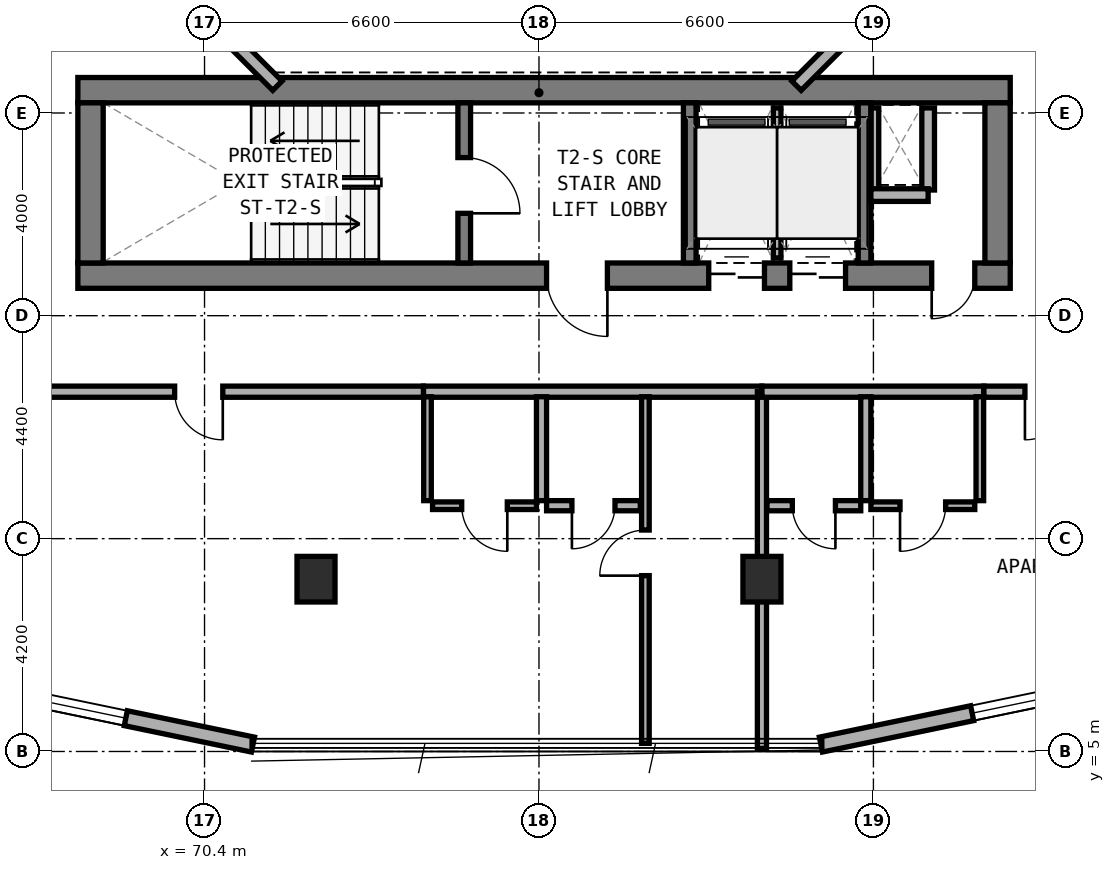
"""IFC4 building model, lengths in metres.
Left out: names, types, materials, properties, quantities, classifications, styles, units other than length and angle.
Written with IfcOpenShell. Run it as: python <this file> out.ifc"""

import sys

from ifc_helpers import new_model, si_unit, direction, frame, frame_2d, origin, origin_2d, place, context, subcontext, project, spatial, rectangle, extrude, element, fill, save


model = new_model("IFC4")
c1 = context("Model", 3, precision=1e-05, world=origin(), true_north=direction((0.0, 1.0)))
c2 = subcontext(c1, "Body", "Model", "MODEL_VIEW")
j1 = project(units=[si_unit("LENGTHUNIT", "METRE"), si_unit("PLANEANGLEUNIT", "RADIAN")], contexts=[c1])
p1 = place(None, origin())
s1 = spatial("IfcSite", under=j1, at=p1, CompositionType="ELEMENT")
p2 = place(p1, origin())
s2 = spatial("IfcBuilding", under=s1, at=p2, CompositionType="ELEMENT")
p3 = place(p2, frame((0.0, 0.0, 62.5)))
s3 = spatial("IfcBuildingStorey", under=s2, at=p3, CompositionType="ELEMENT", Elevation=62.5)
p4 = place(p3, frame((67.9, 14.39, 0.0), z_axis=(0.0, 0.0, 1.0), x_axis=(1.0, 0.0, 0.0)))
e1 = element("IfcWall", 1, at=p4, inside=s3, PredefinedType="SHEAR", context=c2, shape_type="SweptSolid", body=[
    extrude(rectangle(XDim=18.4, YDim=0.5, at=frame_2d((9.2, 0.0))), origin(), (0.0, 0.0, 1.0), 3.5),
])
p5 = place(p4, frame((9.25, 0.0, 0.0)))
e2 = element("IfcOpeningElement", 2, at=p5, cuts=e1, PredefinedType="OPENING", context=c2, shape_type="SweptSolid", body=[
    extrude(rectangle(XDim=1.2, YDim=2.15, at=frame_2d((0.6, 1.075))), frame((0.0, 0.26, 0.0), z_axis=(0.0, -1.0, 0.0), x_axis=(1.0, 0.0, 0.0)), (0.0, 0.0, 1.0), 0.52),
])
p6 = place(p4, frame((16.85, 0.0, 0.0)))
e3 = element("IfcOpeningElement", 3, at=p6, cuts=e1, PredefinedType="OPENING", context=c2, shape_type="SweptSolid", body=[
    extrude(rectangle(XDim=0.85, YDim=2.1, at=frame_2d((0.425, 1.05))), frame((0.0, 0.26, 0.0), z_axis=(0.0, -1.0, 0.0), x_axis=(1.0, 0.0, 0.0)), (0.0, 0.0, 1.0), 0.52),
])
p7 = place(p4, frame((12.45, 0.0, 0.0)))
e4 = element("IfcOpeningElement", 4, at=p7, cuts=e1, PredefinedType="OPENING", context=c2, shape_type="SweptSolid", body=[
    extrude(rectangle(XDim=1.1, YDim=2.15, at=frame_2d((0.55, 1.075))), frame((0.0, 0.26, 0.0), z_axis=(0.0, -1.0, 0.0), x_axis=(1.0, 0.0, 0.0)), (0.0, 0.0, 1.0), 0.52),
])
p8 = place(p4, frame((14.05, 0.0, 0.0)))
e5 = element("IfcOpeningElement", 5, at=p8, cuts=e1, PredefinedType="OPENING", context=c2, shape_type="SweptSolid", body=[
    extrude(rectangle(XDim=1.1, YDim=2.15, at=frame_2d((0.55, 1.075))), frame((0.0, 0.26, 0.0), z_axis=(0.0, -1.0, 0.0), x_axis=(1.0, 0.0, 0.0)), (0.0, 0.0, 1.0), 0.52),
])
p9 = place(p3, frame((67.9, 18.05, 0.0), z_axis=(0.0, 0.0, 1.0), x_axis=(1.0, 0.0, 0.0)))
e6 = element("IfcWall", 6, at=p9, inside=s3, PredefinedType="SHEAR", context=c2, shape_type="SweptSolid", body=[
    extrude(rectangle(XDim=18.4, YDim=0.5, at=frame_2d((9.2, 0.0))), origin(), (0.0, 0.0, 1.0), 3.5),
])
for number, where, z_axis, x_axis in (
    (7, (68.15, 14.64, 0.0), (0.0, 0.0, 1.0), (0.0, 1.0, 0.0)),
    (8, (86.05, 14.64, 0.0), (0.0, 0.0, 1.0), (0.0, 1.0, 0.0)),
):
    element("IfcWall", number, at=place(p3, frame(where, z_axis=z_axis, x_axis=x_axis)), inside=s3, PredefinedType="SHEAR", context=c2, shape_type="SweptSolid", body=[
        extrude(rectangle(XDim=3.16, YDim=0.5, at=frame_2d((1.58, 0.0))), origin(), (0.0, 0.0, 1.0), 3.5),
    ])
p10 = place(p3, frame((75.525, 14.64, 0.0), z_axis=(0.0, 0.0, 1.0), x_axis=(0.0, 1.0, 0.0)))
e9 = element("IfcWall", 9, at=p10, inside=s3, PredefinedType="STANDARD", context=c2, shape_type="SweptSolid", body=[
    extrude(rectangle(XDim=3.16, YDim=0.25, at=frame_2d((1.58, 0.0))), origin(), (0.0, 0.0, 1.0), 3.25),
])
p11 = place(p10, frame((0.98, 0.0, 0.0)))
e10 = element("IfcOpeningElement", 10, at=p11, cuts=e9, PredefinedType="OPENING", context=c2, shape_type="SweptSolid", body=[
    extrude(rectangle(XDim=1.1, YDim=2.15, at=frame_2d((0.55, 1.075))), frame((0.0, 0.135, 0.0), z_axis=(0.0, -1.0, 0.0), x_axis=(1.0, 0.0, 0.0)), (0.0, 0.0, 1.0), 0.27),
])
for number, where, z_axis, x_axis in (
    (11, (79.975, 14.64, 0.0), (0.0, 0.0, 1.0), (0.0, 1.0, 0.0)),
    (12, (83.425, 14.64, 0.0), (0.0, 0.0, 1.0), (0.0, 1.0, 0.0)),
):
    element("IfcWall", number, at=place(p3, frame(where, z_axis=z_axis, x_axis=x_axis)), inside=s3, PredefinedType="STANDARD", context=c2, shape_type="SweptSolid", body=[
        extrude(rectangle(XDim=3.16, YDim=0.25, at=frame_2d((1.58, 0.0))), origin(), (0.0, 0.0, 1.0), 3.25),
    ])
for number, where, z_axis, x_axis in (
    (13, (72.6, 8.4, 0.0), (0.0, 0.0, 1.0), (1.0, 0.0, 0.0)),
    (14, (81.4, 8.4, 0.0), (0.0, 0.0, 1.0), (1.0, 0.0, 0.0)),
):
    element("IfcColumn", number, at=place(p3, frame(where, z_axis=z_axis, x_axis=x_axis)), inside=s3, PredefinedType="COLUMN", context=c2, shape_type="SweptSolid", body=[
        extrude(rectangle(XDim=0.75, YDim=0.9, at=origin_2d()), origin(), (0.0, 0.0, 1.0), 3.5),
    ])
p12 = place(p3, frame((62.622, 6.949, 0.0), z_axis=(0.0, 0.0, 1.0), x_axis=(0.979127260729, -0.203248142175, 0.0)))
e15 = element("IfcWall", 15, at=p12, inside=s3, PredefinedType="STANDARD", context=c2, shape_type="SweptSolid", body=[
    extrude(rectangle(XDim=8.92, YDim=0.3, at=frame_2d((4.46, 0.0))), origin(), (0.0, 0.0, 1.0), 3.25),
])
p13 = place(p12, frame((3.957, 0.0, 0.8)))
e16 = element("IfcOpeningElement", 16, at=p13, cuts=e15, PredefinedType="OPENING", context=c2, shape_type="SweptSolid", body=[
    extrude(rectangle(XDim=2.4, YDim=1.6, at=frame_2d((1.2, 0.8))), frame((0.0, 0.16, 0.0), z_axis=(0.0, -1.0, 0.0), x_axis=(1.0, 0.0, 0.0)), (0.0, 0.0, 1.0), 0.32),
])
p14 = place(p3, frame((82.564, 5.136, 0.0), z_axis=(0.0, 0.0, 1.0), x_axis=(0.979128391325, 0.203242695569, 0.0)))
e17 = element("IfcWall", 17, at=p14, inside=s3, PredefinedType="STANDARD", context=c2, shape_type="SweptSolid", body=[
    extrude(rectangle(XDim=8.92, YDim=0.3, at=frame_2d((4.46, 0.0))), origin(), (0.0, 0.0, 1.0), 3.25),
])
p15 = place(p14, frame((3.048, 0.0, 0.8)))
e18 = element("IfcOpeningElement", 18, at=p15, cuts=e17, PredefinedType="OPENING", context=c2, shape_type="SweptSolid", body=[
    extrude(rectangle(XDim=2.4, YDim=1.6, at=frame_2d((1.2, 0.8))), frame((0.0, 0.16, 0.0), z_axis=(0.0, -1.0, 0.0), x_axis=(1.0, 0.0, 0.0)), (0.0, 0.0, 1.0), 0.32),
])
for number, where, z_axis, x_axis in (
    (19, (82.082, 18.138, 0.0), (0.0, 0.0, 1.0), (0.707, 0.707, 0.0)),
    (20, (70.204, 19.772, 0.0), (0.0, 0.0, 1.0), (0.707, -0.707, 0.0)),
):
    element("IfcWall", number, at=place(p3, frame(where, z_axis=z_axis, x_axis=x_axis)), inside=s3, PredefinedType="STANDARD", context=c2, shape_type="SweptSolid", body=[
        extrude(rectangle(XDim=2.311, YDim=0.26, at=frame_2d((1.155, 0.0))), origin(), (0.0, 0.0, 1.0), 3.25),
    ])
p16 = place(p3, frame((83.63, 16.08, 0.0), z_axis=(0.0, 0.0, 1.0), x_axis=(0.0, 1.0, 0.0)))
e21 = element("IfcWall", 21, at=p16, inside=s3, PredefinedType="PARTITIONING", context=c2, shape_type="SweptSolid", body=[
    extrude(rectangle(XDim=1.62, YDim=0.15, at=frame_2d((0.81, 0.0))), origin(), (0.0, 0.0, 1.0), 2.725),
])
p17 = place(p3, frame((84.68, 16.08, 0.0), z_axis=(0.0, 0.0, 1.0), x_axis=(0.0, 1.0, 0.0)))
e22 = element("IfcWall", 22, at=p17, inside=s3, PredefinedType="SOLIDWALL", context=c2, shape_type="SweptSolid", body=[
    extrude(rectangle(XDim=1.62, YDim=0.25, at=frame_2d((0.81, 0.0))), origin(), (0.0, 0.0, 1.0), 3.22),
])
p18 = place(p3, frame((83.55, 15.98, 0.0), z_axis=(0.0, 0.0, 1.0), x_axis=(1.0, 0.0, 0.0)))
e23 = element("IfcWall", 23, at=p18, inside=s3, PredefinedType="SOLIDWALL", context=c2, shape_type="SweptSolid", body=[
    extrude(rectangle(XDim=1.13, YDim=0.25, at=frame_2d((0.565, 0.0))), origin(), (0.0, 0.0, 1.0), 3.22),
])
p19 = place(p3, frame((81.7, 14.74, 0.0), z_axis=(0.0, 0.0, 1.0), x_axis=(0.0, 1.0, 0.0)))
e24 = element("IfcWall", 24, at=p19, inside=s3, PredefinedType="PARTITIONING", context=c2, shape_type="SweptSolid", body=[
    extrude(rectangle(XDim=2.96, YDim=0.15, at=frame_2d((1.48, 0.0))), origin(), (0.0, 0.0, 1.0), 3.22),
])
p20 = place(p3, frame((74.72, 12.1, 0.0), z_axis=(0.0, 0.0, 1.0), x_axis=(1.0, 0.0, 0.0)))
e25 = element("IfcWall", 25, at=p20, inside=s3, PredefinedType="SOLIDWALL", context=c2, shape_type="SweptSolid", body=[
    extrude(rectangle(XDim=6.68, YDim=0.22, at=frame_2d((3.34, 0.0))), origin(), (0.0, 0.0, 1.0), 2.725),
])
p21 = place(p3, frame((65.85, 12.1, 0.0), z_axis=(0.0, 0.0, 1.0), x_axis=(1.0, 0.0, 0.0)))
e26 = element("IfcWall", 26, at=p21, inside=s3, PredefinedType="SOLIDWALL", context=c2, shape_type="SweptSolid", body=[
    extrude(rectangle(XDim=8.87, YDim=0.22, at=frame_2d((4.435, 0.0))), origin(), (0.0, 0.0, 1.0), 2.725),
])
p22 = place(p21, frame((3.96, 0.0, 0.0)))
e27 = element("IfcOpeningElement", 27, at=p22, cuts=e26, PredefinedType="OPENING", context=c2, shape_type="SweptSolid", body=[
    extrude(rectangle(XDim=0.95, YDim=2.1, at=frame_2d((0.475, 1.05))), frame((0.0, 0.12, 0.0), z_axis=(0.0, -1.0, 0.0), x_axis=(1.0, 0.0, 0.0)), (0.0, 0.0, 1.0), 0.24),
])
p23 = place(p3, frame((79.1, 5.16, 0.0), z_axis=(0.0, 0.0, 1.0), x_axis=(0.0, 1.0, 0.0)))
e28 = element("IfcWall", 28, at=p23, inside=s3, PredefinedType="PARTITIONING", context=c2, shape_type="SweptSolid", body=[
    extrude(rectangle(XDim=6.84, YDim=0.15, at=frame_2d((3.42, 0.0))), origin(), (0.0, 0.0, 1.0), 2.865),
])
p24 = place(p23, frame((3.31, 0.0, 0.0)))
e29 = element("IfcOpeningElement", 29, at=p24, cuts=e28, PredefinedType="OPENING", context=c2, shape_type="SweptSolid", body=[
    extrude(rectangle(XDim=0.9, YDim=2.1, at=frame_2d((0.45, 1.05))), frame((0.0, 0.085, 0.0), z_axis=(0.0, -1.0, 0.0), x_axis=(1.0, 0.0, 0.0)), (0.0, 0.0, 1.0), 0.17),
])
p25 = place(p3, frame((77.05, 9.95, 0.0), z_axis=(0.0, 0.0, 1.0), x_axis=(0.0, 1.0, 0.0)))
e30 = element("IfcWall", 30, at=p25, inside=s3, PredefinedType="PLUMBINGWALL", context=c2, shape_type="SweptSolid", body=[
    extrude(rectangle(XDim=2.05, YDim=0.2, at=frame_2d((1.025, 0.0))), origin(), (0.0, 0.0, 1.0), 2.895),
])
p26 = place(p3, frame((74.8, 9.95, 0.0), z_axis=(0.0, 0.0, 1.0), x_axis=(0.0, 1.0, 0.0)))
e31 = element("IfcWall", 31, at=p26, inside=s3, PredefinedType="PARTITIONING", context=c2, shape_type="SweptSolid", body=[
    extrude(rectangle(XDim=2.05, YDim=0.15, at=frame_2d((1.025, 0.0))), origin(), (0.0, 0.0, 1.0), 2.895),
])
p27 = place(p3, frame((77.15, 9.85, 0.0), z_axis=(0.0, 0.0, 1.0), x_axis=(1.0, 0.0, 0.0)))
e32 = element("IfcWall", 32, at=p27, inside=s3, PredefinedType="PLUMBINGWALL", context=c2, shape_type="SweptSolid", body=[
    extrude(rectangle(XDim=1.85, YDim=0.2, at=frame_2d((0.925, 0.0))), origin(), (0.0, 0.0, 1.0), 3.22),
])
p28 = place(p27, frame((0.5, 0.0, 0.0)))
e33 = element("IfcOpeningElement", 33, at=p28, cuts=e32, PredefinedType="OPENING", context=c2, shape_type="SweptSolid", body=[
    extrude(rectangle(XDim=0.85, YDim=2.1, at=frame_2d((0.425, 1.05))), frame((0.0, 0.11, 0.0), z_axis=(0.0, -1.0, 0.0), x_axis=(1.0, 0.0, 0.0)), (0.0, 0.0, 1.0), 0.22),
])
p29 = place(p3, frame((74.9, 9.85, 0.0), z_axis=(0.0, 0.0, 1.0), x_axis=(1.0, 0.0, 0.0)))
e34 = element("IfcWall", 34, at=p29, inside=s3, PredefinedType="PARTITIONING", context=c2, shape_type="SweptSolid", body=[
    extrude(rectangle(XDim=2.05, YDim=0.15, at=frame_2d((1.025, 0.0))), origin(), (0.0, 0.0, 1.0), 3.22),
])
p30 = place(p29, frame((0.575, 0.0, 0.0)))
e35 = element("IfcOpeningElement", 35, at=p30, cuts=e34, PredefinedType="OPENING", context=c2, shape_type="SweptSolid", body=[
    extrude(rectangle(XDim=0.9, YDim=2.1, at=frame_2d((0.45, 1.05))), frame((0.0, 0.085, 0.0), z_axis=(0.0, -1.0, 0.0), x_axis=(1.0, 0.0, 0.0)), (0.0, 0.0, 1.0), 0.17),
])
p31 = place(p3, frame((81.4, 5.06, 0.0), z_axis=(0.0, 0.0, 1.0), x_axis=(0.0, 1.0, 0.0)))
e36 = element("IfcWall", 36, at=p31, inside=s3, PredefinedType="SOLIDWALL", context=c2, shape_type="SweptSolid", body=[
    extrude(rectangle(XDim=7.04, YDim=0.18, at=frame_2d((3.52, 0.0))), origin(), (0.0, 0.0, 1.0), 2.725),
])
p32 = place(p3, frame((81.4, 12.1, 0.0), z_axis=(0.0, 0.0, 1.0), x_axis=(1.0, 0.0, 0.0)))
e37 = element("IfcWall", 37, at=p32, inside=s3, PredefinedType="SOLIDWALL", context=c2, shape_type="SweptSolid", body=[
    extrude(rectangle(XDim=4.38, YDim=0.22, at=frame_2d((2.19, 0.0))), origin(), (0.0, 0.0, 1.0), 2.725),
])
p33 = place(p3, frame((85.78, 12.1, 0.0), z_axis=(0.0, 0.0, 1.0), x_axis=(1.0, 0.0, 0.0)))
e38 = element("IfcWall", 38, at=p33, inside=s3, PredefinedType="SOLIDWALL", context=c2, shape_type="SweptSolid", body=[
    extrude(rectangle(XDim=2.57, YDim=0.22, at=frame_2d((1.285, 0.0))), origin(), (0.0, 0.0, 1.0), 3.22),
])
p34 = place(p33, frame((0.81, 0.0, 0.0)))
e39 = element("IfcOpeningElement", 39, at=p34, cuts=e38, PredefinedType="OPENING", context=c2, shape_type="SweptSolid", body=[
    extrude(rectangle(XDim=0.95, YDim=2.1, at=frame_2d((0.475, 1.05))), frame((0.0, 0.12, 0.0), z_axis=(0.0, -1.0, 0.0), x_axis=(1.0, 0.0, 0.0)), (0.0, 0.0, 1.0), 0.24),
])
p35 = place(p3, frame((83.45, 9.95, 0.0), z_axis=(0.0, 0.0, 1.0), x_axis=(0.0, 1.0, 0.0)))
e40 = element("IfcWall", 40, at=p35, inside=s3, PredefinedType="PLUMBINGWALL", context=c2, shape_type="SweptSolid", body=[
    extrude(rectangle(XDim=2.05, YDim=0.2, at=frame_2d((1.025, 0.0))), origin(), (0.0, 0.0, 1.0), 3.22),
])
p36 = place(p3, frame((85.7, 9.95, 0.0), z_axis=(0.0, 0.0, 1.0), x_axis=(0.0, 1.0, 0.0)))
e41 = element("IfcWall", 41, at=p36, inside=s3, PredefinedType="PARTITIONING", context=c2, shape_type="SweptSolid", body=[
    extrude(rectangle(XDim=2.05, YDim=0.15, at=frame_2d((1.025, 0.0))), origin(), (0.0, 0.0, 1.0), 3.22),
])
p37 = place(p3, frame((81.5, 9.85, 0.0), z_axis=(0.0, 0.0, 1.0), x_axis=(1.0, 0.0, 0.0)))
e42 = element("IfcWall", 42, at=p37, inside=s3, PredefinedType="PLUMBINGWALL", context=c2, shape_type="SweptSolid", body=[
    extrude(rectangle(XDim=1.85, YDim=0.2, at=frame_2d((0.925, 0.0))), origin(), (0.0, 0.0, 1.0), 2.725),
])
p38 = place(p37, frame((0.5, 0.0, 0.0)))
e43 = element("IfcOpeningElement", 43, at=p38, cuts=e42, PredefinedType="OPENING", context=c2, shape_type="SweptSolid", body=[
    extrude(rectangle(XDim=0.85, YDim=2.1, at=frame_2d((0.425, 1.05))), frame((0.0, 0.11, 0.0), z_axis=(0.0, -1.0, 0.0), x_axis=(1.0, 0.0, 0.0)), (0.0, 0.0, 1.0), 0.22),
])
p39 = place(p3, frame((83.55, 9.85, 0.0), z_axis=(0.0, 0.0, 1.0), x_axis=(1.0, 0.0, 0.0)))
e44 = element("IfcWall", 44, at=p39, inside=s3, PredefinedType="PARTITIONING", context=c2, shape_type="SweptSolid", body=[
    extrude(rectangle(XDim=2.05, YDim=0.15, at=frame_2d((1.025, 0.0))), origin(), (0.0, 0.0, 1.0), 3.22),
])
p40 = place(p39, frame((0.575, 0.0, 0.0)))
e45 = element("IfcOpeningElement", 45, at=p40, cuts=e44, PredefinedType="OPENING", context=c2, shape_type="SweptSolid", body=[
    extrude(rectangle(XDim=0.9, YDim=2.1, at=frame_2d((0.45, 1.05))), frame((0.0, 0.085, 0.0), z_axis=(0.0, -1.0, 0.0), x_axis=(1.0, 0.0, 0.0)), (0.0, 0.0, 1.0), 0.17),
])
p41 = place(p13, origin())
e46 = element("IfcWindow", 46, at=p41, inside=s3, PartitioningType="SINGLE_PANEL", PredefinedType="WINDOW", context=c2, shape_type="SweptSolid", body=[
    extrude(rectangle(XDim=2.4, YDim=1.6, at=frame_2d((1.2, 0.8))), frame((0.0, 0.03, 0.0), z_axis=(0.0, -1.0, 0.0), x_axis=(1.0, 0.0, 0.0)), (0.0, 0.0, 1.0), 0.06),
])
fill(e16, e46)
p42 = place(p15, origin())
e47 = element("IfcWindow", 47, at=p42, inside=s3, PartitioningType="SINGLE_PANEL", PredefinedType="WINDOW", context=c2, shape_type="SweptSolid", body=[
    extrude(rectangle(XDim=2.4, YDim=1.6, at=frame_2d((1.2, 0.8))), frame((0.0, 0.03, 0.0), z_axis=(0.0, -1.0, 0.0), x_axis=(1.0, 0.0, 0.0)), (0.0, 0.0, 1.0), 0.06),
])
fill(e18, e47)
p43 = place(p11, frame((1.1, 0.0, 0.0), z_axis=(0.0, 0.0, 1.0), x_axis=(-1.0, 0.0, 0.0)))
e48 = element("IfcDoor", 48, at=p43, inside=s3, OperationType="SINGLE_SWING_RIGHT", PredefinedType="DOOR", context=c2, shape_type="SweptSolid", body=[
    extrude(rectangle(XDim=1.1, YDim=2.15, at=frame_2d((0.55, 1.075))), frame((0.0, 0.025, 0.0), z_axis=(0.0, -1.0, 0.0), x_axis=(1.0, 0.0, 0.0)), (0.0, 0.0, 1.0), 0.05),
])
fill(e10, e48)
p44 = place(p5, frame((1.2, 0.0, 0.0), z_axis=(0.0, 0.0, 1.0), x_axis=(-1.0, 0.0, 0.0)))
e49 = element("IfcDoor", 49, at=p44, inside=s3, OperationType="SINGLE_SWING_LEFT", PredefinedType="DOOR", context=c2, shape_type="SweptSolid", body=[
    extrude(rectangle(XDim=1.2, YDim=2.15, at=frame_2d((0.6, 1.075))), frame((0.0, 0.025, 0.0), z_axis=(0.0, -1.0, 0.0), x_axis=(1.0, 0.0, 0.0)), (0.0, 0.0, 1.0), 0.05),
])
fill(e2, e49)
p45 = place(p6, frame((0.85, 0.0, 0.0), z_axis=(0.0, 0.0, 1.0), x_axis=(-1.0, 0.0, 0.0)))
e50 = element("IfcDoor", 50, at=p45, inside=s3, OperationType="SINGLE_SWING_RIGHT", PredefinedType="DOOR", context=c2, shape_type="SweptSolid", body=[
    extrude(rectangle(XDim=0.85, YDim=2.1, at=frame_2d((0.425, 1.05))), frame((0.0, 0.025, 0.0), z_axis=(0.0, -1.0, 0.0), x_axis=(1.0, 0.0, 0.0)), (0.0, 0.0, 1.0), 0.05),
])
fill(e3, e50)
p46 = place(p7, frame((1.1, 0.0, 0.0), z_axis=(0.0, 0.0, 1.0), x_axis=(-1.0, 0.0, 0.0)))
e51 = element("IfcDoor", 51, at=p46, inside=s3, OperationType="DOUBLE_DOOR_SLIDING", PredefinedType="DOOR", context=c2, shape_type="SweptSolid", body=[
    extrude(rectangle(XDim=1.1, YDim=2.15, at=frame_2d((0.55, 1.075))), frame((0.0, 0.025, 0.0), z_axis=(0.0, -1.0, 0.0), x_axis=(1.0, 0.0, 0.0)), (0.0, 0.0, 1.0), 0.05),
])
fill(e4, e51)
p47 = place(p8, frame((1.1, 0.0, 0.0), z_axis=(0.0, 0.0, 1.0), x_axis=(-1.0, 0.0, 0.0)))
e52 = element("IfcDoor", 52, at=p47, inside=s3, OperationType="DOUBLE_DOOR_SLIDING", PredefinedType="DOOR", context=c2, shape_type="SweptSolid", body=[
    extrude(rectangle(XDim=1.1, YDim=2.15, at=frame_2d((0.55, 1.075))), frame((0.0, 0.025, 0.0), z_axis=(0.0, -1.0, 0.0), x_axis=(1.0, 0.0, 0.0)), (0.0, 0.0, 1.0), 0.05),
])
fill(e5, e52)
p48 = place(p22, frame((0.95, 0.0, 0.0), z_axis=(0.0, 0.0, 1.0), x_axis=(-1.0, 0.0, 0.0)))
e53 = element("IfcDoor", 53, at=p48, inside=s3, OperationType="SINGLE_SWING_LEFT", PredefinedType="DOOR", context=c2, shape_type="SweptSolid", body=[
    extrude(rectangle(XDim=0.95, YDim=2.1, at=frame_2d((0.475, 1.05))), frame((0.0, 0.025, 0.0), z_axis=(0.0, -1.0, 0.0), x_axis=(1.0, 0.0, 0.0)), (0.0, 0.0, 1.0), 0.05),
])
fill(e27, e53)
p49 = place(p24, origin())
e54 = element("IfcDoor", 54, at=p49, inside=s3, OperationType="SINGLE_SWING_LEFT", PredefinedType="DOOR", context=c2, shape_type="SweptSolid", body=[
    extrude(rectangle(XDim=0.9, YDim=2.1, at=frame_2d((0.45, 1.05))), frame((0.0, 0.025, 0.0), z_axis=(0.0, -1.0, 0.0), x_axis=(1.0, 0.0, 0.0)), (0.0, 0.0, 1.0), 0.05),
])
fill(e29, e54)
p50 = place(p28, frame((0.85, 0.0, 0.0), z_axis=(0.0, 0.0, 1.0), x_axis=(-1.0, 0.0, 0.0)))
e55 = element("IfcDoor", 55, at=p50, inside=s3, OperationType="SINGLE_SWING_RIGHT", PredefinedType="DOOR", context=c2, shape_type="SweptSolid", body=[
    extrude(rectangle(XDim=0.85, YDim=2.1, at=frame_2d((0.425, 1.05))), frame((0.0, 0.025, 0.0), z_axis=(0.0, -1.0, 0.0), x_axis=(1.0, 0.0, 0.0)), (0.0, 0.0, 1.0), 0.05),
])
fill(e33, e55)
p51 = place(p30, frame((0.9, 0.0, 0.0), z_axis=(0.0, 0.0, 1.0), x_axis=(-1.0, 0.0, 0.0)))
e56 = element("IfcDoor", 56, at=p51, inside=s3, OperationType="SINGLE_SWING_LEFT", PredefinedType="DOOR", context=c2, shape_type="SweptSolid", body=[
    extrude(rectangle(XDim=0.9, YDim=2.1, at=frame_2d((0.45, 1.05))), frame((0.0, 0.025, 0.0), z_axis=(0.0, -1.0, 0.0), x_axis=(1.0, 0.0, 0.0)), (0.0, 0.0, 1.0), 0.05),
])
fill(e35, e56)
p52 = place(p34, frame((0.95, 0.0, 0.0), z_axis=(0.0, 0.0, 1.0), x_axis=(-1.0, 0.0, 0.0)))
e57 = element("IfcDoor", 57, at=p52, inside=s3, OperationType="SINGLE_SWING_RIGHT", PredefinedType="DOOR", context=c2, shape_type="SweptSolid", body=[
    extrude(rectangle(XDim=0.95, YDim=2.1, at=frame_2d((0.475, 1.05))), frame((0.0, 0.025, 0.0), z_axis=(0.0, -1.0, 0.0), x_axis=(1.0, 0.0, 0.0)), (0.0, 0.0, 1.0), 0.05),
])
fill(e39, e57)
p53 = place(p38, frame((0.85, 0.0, 0.0), z_axis=(0.0, 0.0, 1.0), x_axis=(-1.0, 0.0, 0.0)))
e58 = element("IfcDoor", 58, at=p53, inside=s3, OperationType="SINGLE_SWING_LEFT", PredefinedType="DOOR", context=c2, shape_type="SweptSolid", body=[
    extrude(rectangle(XDim=0.85, YDim=2.1, at=frame_2d((0.425, 1.05))), frame((0.0, 0.025, 0.0), z_axis=(0.0, -1.0, 0.0), x_axis=(1.0, 0.0, 0.0)), (0.0, 0.0, 1.0), 0.05),
])
fill(e43, e58)
p54 = place(p40, frame((0.9, 0.0, 0.0), z_axis=(0.0, 0.0, 1.0), x_axis=(-1.0, 0.0, 0.0)))
e59 = element("IfcDoor", 59, at=p54, inside=s3, OperationType="SINGLE_SWING_RIGHT", PredefinedType="DOOR", context=c2, shape_type="SweptSolid", body=[
    extrude(rectangle(XDim=0.9, YDim=2.1, at=frame_2d((0.45, 1.05))), frame((0.0, 0.025, 0.0), z_axis=(0.0, -1.0, 0.0), x_axis=(1.0, 0.0, 0.0)), (0.0, 0.0, 1.0), 0.05),
])
fill(e45, e59)
save(model, sys.argv[1])
